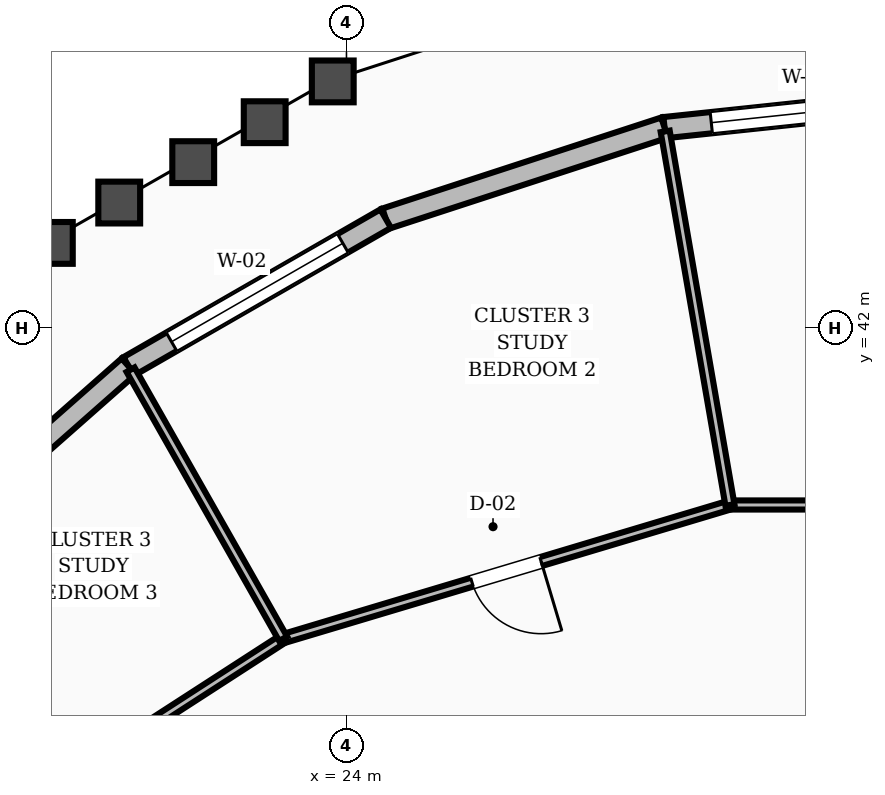
"""IFC4 building model, lengths in metres.
Left out: names, types, materials, properties, quantities, classifications, styles, units other than length and angle.
Written with IfcOpenShell. Run it as: python <this file> out.ifc"""

import sys

from ifc_helpers import new_model, si_unit, direction, frame, frame_2d, origin, place, context, subcontext, project, spatial, rectangle, extrude, element, fill, save


model = new_model("IFC4")
c1 = context("Model", 3, precision=1e-05, world=origin(), true_north=direction((0.0, 1.0)))
c2 = subcontext(c1, "Body", "Model", "MODEL_VIEW")
j1 = project(units=[si_unit("LENGTHUNIT", "METRE"), si_unit("PLANEANGLEUNIT", "RADIAN")], contexts=[c1])
p1 = place(None, origin())
s1 = spatial("IfcSite", under=j1, at=p1, CompositionType="ELEMENT")
p2 = place(p1, origin())
s2 = spatial("IfcBuilding", under=s1, at=p2, CompositionType="ELEMENT")
p3 = place(p2, frame((0.0, 0.0, 268.8)))
s3 = spatial("IfcBuildingStorey", under=s2, at=p3, CompositionType="ELEMENT", Elevation=268.8)
p4 = place(p3, frame((32.0, 45.037, 0.0), z_axis=(0.0, 0.0, 1.0), x_axis=(-0.99443198522, -0.105380390832, 0.0)))
e1 = element("IfcWall", 1, at=p4, inside=s3, PredefinedType="STANDARD", context=c2, shape_type="SweptSolid", body=[
    extrude(rectangle(XDim=3.836, YDim=0.28, at=frame_2d((1.918, 0.0))), origin(), (0.0, 0.0, 1.0), 2.88),
])
p5 = place(p4, frame((0.618, 0.0, 0.8)))
e2 = element("IfcOpeningElement", 2, at=p5, cuts=e1, PredefinedType="OPENING", context=c2, shape_type="SweptSolid", body=[
    extrude(rectangle(XDim=2.6, YDim=1.65, at=frame_2d((1.3, 0.825))), frame((0.0, 0.15, 0.0), z_axis=(0.0, -1.0, 0.0), x_axis=(1.0, 0.0, 0.0)), (0.0, 0.0, 1.0), 0.3),
])
p6 = place(p3, frame((28.185, 44.633, 0.0), z_axis=(0.0, 0.0, 1.0), x_axis=(-0.950681997555, -0.310167276684, 0.0)))
e3 = element("IfcWall", 3, at=p6, inside=s3, PredefinedType="STANDARD", context=c2, shape_type="SweptSolid", body=[
    extrude(rectangle(XDim=3.859, YDim=0.28, at=frame_2d((1.93, 0.0))), origin(), (0.0, 0.0, 1.0), 2.88),
])
p7 = place(p3, frame((24.516, 43.436, 0.0), z_axis=(0.0, 0.0, 1.0), x_axis=(-0.866911036779, -0.498462891608, 0.0)))
e4 = element("IfcWall", 4, at=p7, inside=s3, PredefinedType="STANDARD", context=c2, shape_type="SweptSolid", body=[
    extrude(rectangle(XDim=3.9, YDim=0.28, at=frame_2d((1.95, 0.0))), origin(), (0.0, 0.0, 1.0), 2.88),
])
p8 = place(p7, frame((0.65, 0.0, 0.8)))
e5 = element("IfcOpeningElement", 5, at=p8, cuts=e4, PredefinedType="OPENING", context=c2, shape_type="SweptSolid", body=[
    extrude(rectangle(XDim=2.6, YDim=1.65, at=frame_2d((1.3, 0.825))), frame((0.0, 0.15, 0.0), z_axis=(0.0, -1.0, 0.0), x_axis=(1.0, 0.0, 0.0)), (0.0, 0.0, 1.0), 0.3),
])
p9 = place(p3, frame((21.135, 41.492, 0.0), z_axis=(0.0, 0.0, 1.0), x_axis=(-0.749653985562, -0.661829964515, 0.0)))
e6 = element("IfcWall", 6, at=p9, inside=s3, PredefinedType="STANDARD", context=c2, shape_type="SweptSolid", body=[
    extrude(rectangle(XDim=3.953, YDim=0.28, at=frame_2d((1.977, 0.0))), origin(), (0.0, 0.0, 1.0), 2.88),
])
p10 = place(p3, frame((34.955, 39.668, 0.0), z_axis=(0.0, 0.0, 1.0), x_axis=(-1.0, 0.0, 0.0)))
e7 = element("IfcWall", 7, at=p10, inside=s3, PredefinedType="PARTITIONING", context=c2, shape_type="SweptSolid", body=[
    extrude(rectangle(XDim=5.91, YDim=0.12, at=frame_2d((2.955, 0.0))), origin(), (0.0, 0.0, 1.0), 2.87),
])
p11 = place(p10, frame((3.377, 0.0, 0.0)))
e8 = element("IfcOpeningElement", 8, at=p11, cuts=e7, PredefinedType="OPENING", context=c2, shape_type="SweptSolid", body=[
    extrude(rectangle(XDim=0.95, YDim=2.1, at=frame_2d((0.475, 1.05))), frame((0.0, 0.07, 0.0), z_axis=(0.0, -1.0, 0.0), x_axis=(1.0, 0.0, 0.0)), (0.0, 0.0, 1.0), 0.14),
])
p12 = place(p3, frame((29.045, 39.668, 0.0), z_axis=(0.0, 0.0, 1.0), x_axis=(-0.958019889786, -0.28670174533, 0.0)))
e9 = element("IfcWall", 9, at=p12, inside=s3, PredefinedType="PARTITIONING", context=c2, shape_type="SweptSolid", body=[
    extrude(rectangle(XDim=6.136, YDim=0.12, at=frame_2d((3.068, 0.0))), origin(), (0.0, 0.0, 1.0), 2.87),
])
p13 = place(p12, frame((2.593, 0.0, 0.0)))
e10 = element("IfcOpeningElement", 10, at=p13, cuts=e9, PredefinedType="OPENING", context=c2, shape_type="SweptSolid", body=[
    extrude(rectangle(XDim=0.95, YDim=2.1, at=frame_2d((0.475, 1.05))), frame((0.0, 0.07, 0.0), z_axis=(0.0, -1.0, 0.0), x_axis=(1.0, 0.0, 0.0)), (0.0, 0.0, 1.0), 0.14),
])
p14 = place(p3, frame((29.045, 39.668, 0.0), z_axis=(0.0, 0.0, 1.0), x_axis=(-0.170808263467, 0.985304286569, 0.0)))
e11 = element("IfcWall", 11, at=p14, inside=s3, PredefinedType="PARTITIONING", context=c2, shape_type="SweptSolid", body=[
    extrude(rectangle(XDim=4.988, YDim=0.12, at=frame_2d((2.494, 0.0))), origin(), (0.0, 0.0, 1.0), 2.87),
])
p15 = place(p3, frame((23.167, 37.909, 0.0), z_axis=(0.0, 0.0, 1.0), x_axis=(-0.83981921831, -0.542866171866, 0.0)))
e12 = element("IfcWall", 12, at=p15, inside=s3, PredefinedType="PARTITIONING", context=c2, shape_type="SweptSolid", body=[
    extrude(rectangle(XDim=6.835, YDim=0.12, at=frame_2d((3.418, 0.0))), origin(), (0.0, 0.0, 1.0), 2.87),
])
p16 = place(p15, frame((2.943, 0.0, 0.0)))
e13 = element("IfcOpeningElement", 13, at=p16, cuts=e12, PredefinedType="OPENING", context=c2, shape_type="SweptSolid", body=[
    extrude(rectangle(XDim=0.95, YDim=2.1, at=frame_2d((0.475, 1.05))), frame((0.0, 0.07, 0.0), z_axis=(0.0, -1.0, 0.0), x_axis=(1.0, 0.0, 0.0)), (0.0, 0.0, 1.0), 0.14),
])
p17 = place(p3, frame((23.167, 37.909, 0.0), z_axis=(0.0, 0.0, 1.0), x_axis=(-0.493338072586, 0.869837655047, 0.0)))
e14 = element("IfcWall", 14, at=p17, inside=s3, PredefinedType="PARTITIONING", context=c2, shape_type="SweptSolid", body=[
    extrude(rectangle(XDim=4.068, YDim=0.12, at=frame_2d((2.034, 0.0))), origin(), (0.0, 0.0, 1.0), 2.87),
])
p18 = place(p5, origin())
e15 = element("IfcWindow", 15, at=p18, inside=s3, PartitioningType="SINGLE_PANEL", PredefinedType="WINDOW", context=c2, shape_type="SweptSolid", body=[
    extrude(rectangle(XDim=2.6, YDim=1.65, at=frame_2d((1.3, 0.825))), frame((0.0, 0.03, 0.0), z_axis=(0.0, -1.0, 0.0), x_axis=(1.0, 0.0, 0.0)), (0.0, 0.0, 1.0), 0.06),
])
fill(e2, e15)
p19 = place(p8, origin())
e16 = element("IfcWindow", 16, at=p19, inside=s3, PartitioningType="SINGLE_PANEL", PredefinedType="WINDOW", context=c2, shape_type="SweptSolid", body=[
    extrude(rectangle(XDim=2.6, YDim=1.65, at=frame_2d((1.3, 0.825))), frame((0.0, 0.03, 0.0), z_axis=(0.0, -1.0, 0.0), x_axis=(1.0, 0.0, 0.0)), (0.0, 0.0, 1.0), 0.06),
])
fill(e5, e16)
p20 = place(p13, origin())
e17 = element("IfcDoor", 17, at=p20, inside=s3, OperationType="SINGLE_SWING_LEFT", PredefinedType="DOOR", context=c2, shape_type="SweptSolid", body=[
    extrude(rectangle(XDim=0.95, YDim=2.1, at=frame_2d((0.475, 1.05))), frame((0.0, 0.025, 0.0), z_axis=(0.0, -1.0, 0.0), x_axis=(1.0, 0.0, 0.0)), (0.0, 0.0, 1.0), 0.05),
])
fill(e10, e17)
save(model, sys.argv[1])
